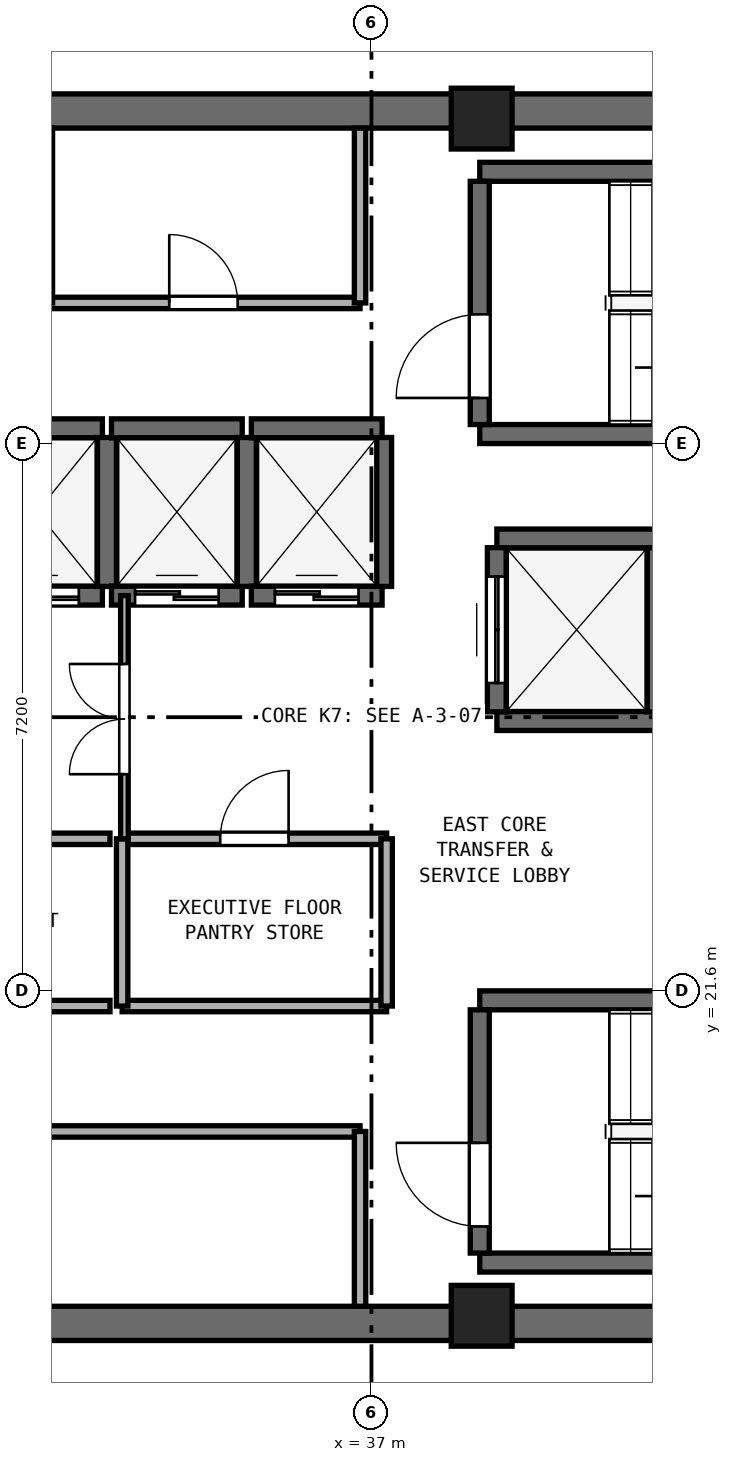
"""IFC4 building model, lengths in metres.
Left out: names, types, materials, properties, quantities, classifications, styles, units other than length and angle.
Written with IfcOpenShell. Run it as: python <this file> out.ifc"""

import sys

from ifc_helpers import new_model, si_unit, direction, frame, frame_2d, origin, origin_2d, place, context, subcontext, project, spatial, rectangle, extrude, element, fill, save


model = new_model("IFC4")
c1 = context("Model", 3, precision=1e-05, world=origin(), true_north=direction((0.0, 1.0)))
c2 = subcontext(c1, "Body", "Model", "MODEL_VIEW")
j1 = project(units=[si_unit("LENGTHUNIT", "METRE"), si_unit("PLANEANGLEUNIT", "RADIAN")], contexts=[c1])
p1 = place(None, origin())
s1 = spatial("IfcSite", under=j1, at=p1, CompositionType="ELEMENT")
p2 = place(p1, origin())
s2 = spatial("IfcBuilding", under=s1, at=p2, CompositionType="ELEMENT")
p3 = place(p2, frame((0.0, 0.0, 278.2)))
s3 = spatial("IfcBuildingStorey", under=s2, at=p3, CompositionType="ELEMENT", Elevation=278.2)
for number, where, z_axis, x_axis in (
    (1, (25.4, 17.225, 0.0), (0.0, 0.0, 1.0), (1.0, 0.0, 0.0)),
    (2, (25.4, 33.175, 0.0), (0.0, 0.0, 1.0), (1.0, 0.0, 0.0)),
):
    element("IfcWall", number, at=place(p3, frame(where, z_axis=z_axis, x_axis=x_axis)), inside=s3, PredefinedType="SHEAR", context=c2, shape_type="SweptSolid", body=[
        extrude(rectangle(XDim=23.2, YDim=0.45, at=frame_2d((11.6, 0.0))), origin(), (0.0, 0.0, 1.0), 3.54),
    ])
for number, where, z_axis, x_axis in (
    (3, (38.45, 17.325, 0.0), (0.0, 0.0, 1.0), (1.0, 0.0, 0.0)),
    (4, (38.45, 33.075, 0.0), (0.0, 0.0, 1.0), (1.0, 0.0, 0.0)),
):
    element("IfcColumn", number, at=place(p3, frame(where, z_axis=z_axis, x_axis=x_axis)), inside=s3, PredefinedType="PILASTER", context=c2, shape_type="SweptSolid", body=[
        extrude(rectangle(XDim=0.8, YDim=0.8, at=origin_2d()), origin(), (0.0, 0.0, 1.0), 3.8),
    ])
for number, where, z_axis, x_axis in (
    (5, (38.425, 28.925, 0.0), (0.0, 0.0, 1.0), (1.0, 0.0, 0.0)),
    (6, (38.425, 32.375, 0.0), (0.0, 0.0, 1.0), (1.0, 0.0, 0.0)),
):
    element("IfcWall", number, at=place(p3, frame(where, z_axis=z_axis, x_axis=x_axis)), inside=s3, PredefinedType="SHEAR", context=c2, shape_type="SweptSolid", body=[
        extrude(rectangle(XDim=7.3, YDim=0.25, at=frame_2d((3.65, 0.0))), origin(), (0.0, 0.0, 1.0), 3.54),
    ])
p4 = place(p3, frame((38.425, 29.05, 0.0), z_axis=(0.0, 0.0, 1.0), x_axis=(0.0, 1.0, 0.0)))
e7 = element("IfcWall", 7, at=p4, inside=s3, PredefinedType="SHEAR", context=c2, shape_type="SweptSolid", body=[
    extrude(rectangle(XDim=3.2, YDim=0.25, at=frame_2d((1.6, 0.0))), origin(), (0.0, 0.0, 1.0), 3.54),
])
p5 = place(p4, frame((0.35, 0.0, 0.0)))
e8 = element("IfcOpeningElement", 8, at=p5, cuts=e7, PredefinedType="OPENING", context=c2, shape_type="SweptSolid", body=[
    extrude(rectangle(XDim=1.1, YDim=2.15, at=frame_2d((0.55, 1.075))), frame((0.0, 0.135, 0.0), z_axis=(0.0, -1.0, 0.0), x_axis=(1.0, 0.0, 0.0)), (0.0, 0.0, 1.0), 0.27),
])
for number, where, z_axis, x_axis in (
    (9, (38.425, 18.025, 0.0), (0.0, 0.0, 1.0), (1.0, 0.0, 0.0)),
    (10, (38.425, 21.475, 0.0), (0.0, 0.0, 1.0), (1.0, 0.0, 0.0)),
):
    element("IfcWall", number, at=place(p3, frame(where, z_axis=z_axis, x_axis=x_axis)), inside=s3, PredefinedType="SHEAR", context=c2, shape_type="SweptSolid", body=[
        extrude(rectangle(XDim=7.3, YDim=0.25, at=frame_2d((3.65, 0.0))), origin(), (0.0, 0.0, 1.0), 3.54),
    ])
p6 = place(p3, frame((38.425, 18.15, 0.0), z_axis=(0.0, 0.0, 1.0), x_axis=(0.0, 1.0, 0.0)))
e11 = element("IfcWall", 11, at=p6, inside=s3, PredefinedType="SHEAR", context=c2, shape_type="SweptSolid", body=[
    extrude(rectangle(XDim=3.2, YDim=0.25, at=frame_2d((1.6, 0.0))), origin(), (0.0, 0.0, 1.0), 3.54),
])
p7 = place(p6, frame((0.35, 0.0, 0.0)))
e12 = element("IfcOpeningElement", 12, at=p7, cuts=e11, PredefinedType="OPENING", context=c2, shape_type="SweptSolid", body=[
    extrude(rectangle(XDim=1.1, YDim=2.15, at=frame_2d((0.55, 1.075))), frame((0.0, 0.135, 0.0), z_axis=(0.0, -1.0, 0.0), x_axis=(1.0, 0.0, 0.0)), (0.0, 0.0, 1.0), 0.27),
])
p8 = place(p3, frame((31.74, 26.8, 0.0), z_axis=(0.0, 0.0, 1.0), x_axis=(1.0, 0.0, 0.0)))
e13 = element("IfcWall", 13, at=p8, inside=s3, PredefinedType="SHEAR", context=c2, shape_type="SweptSolid", body=[
    extrude(rectangle(XDim=1.72, YDim=0.25, at=frame_2d((0.86, 0.0))), origin(), (0.0, 0.0, 1.0), 3.54),
])
p9 = place(p8, frame((0.31, 0.0, 0.0)))
e14 = element("IfcOpeningElement", 14, at=p9, cuts=e13, PredefinedType="OPENING", context=c2, shape_type="SweptSolid", body=[
    extrude(rectangle(XDim=1.1, YDim=2.15, at=frame_2d((0.55, 1.075))), frame((0.0, 0.135, 0.0), z_axis=(0.0, -1.0, 0.0), x_axis=(1.0, 0.0, 0.0)), (0.0, 0.0, 1.0), 0.27),
])
p10 = place(p3, frame((31.74, 29.0, 0.0), z_axis=(0.0, 0.0, 1.0), x_axis=(1.0, 0.0, 0.0)))
e15 = element("IfcWall", 15, at=p10, inside=s3, PredefinedType="SHEAR", context=c2, shape_type="SweptSolid", body=[
    extrude(rectangle(XDim=1.72, YDim=0.25, at=frame_2d((0.86, 0.0))), origin(), (0.0, 0.0, 1.0), 3.54),
])
p11 = place(p3, frame((33.52, 26.92, 0.0), z_axis=(0.0, 0.0, 1.0), x_axis=(0.0, 1.0, 0.0)))
e16 = element("IfcWall", 16, at=p11, inside=s3, PredefinedType="SHEAR", context=c2, shape_type="SweptSolid", body=[
    extrude(rectangle(XDim=1.96, YDim=0.25, at=frame_2d((0.98, 0.0))), origin(), (0.0, 0.0, 1.0), 3.54),
])
p12 = place(p3, frame((33.58, 26.8, 0.0), z_axis=(0.0, 0.0, 1.0), x_axis=(1.0, 0.0, 0.0)))
e17 = element("IfcWall", 17, at=p12, inside=s3, PredefinedType="SHEAR", context=c2, shape_type="SweptSolid", body=[
    extrude(rectangle(XDim=1.72, YDim=0.25, at=frame_2d((0.86, 0.0))), origin(), (0.0, 0.0, 1.0), 3.54),
])
p13 = place(p12, frame((0.31, 0.0, 0.0)))
e18 = element("IfcOpeningElement", 18, at=p13, cuts=e17, PredefinedType="OPENING", context=c2, shape_type="SweptSolid", body=[
    extrude(rectangle(XDim=1.1, YDim=2.15, at=frame_2d((0.55, 1.075))), frame((0.0, 0.135, 0.0), z_axis=(0.0, -1.0, 0.0), x_axis=(1.0, 0.0, 0.0)), (0.0, 0.0, 1.0), 0.27),
])
p14 = place(p3, frame((33.58, 29.0, 0.0), z_axis=(0.0, 0.0, 1.0), x_axis=(1.0, 0.0, 0.0)))
e19 = element("IfcWall", 19, at=p14, inside=s3, PredefinedType="SHEAR", context=c2, shape_type="SweptSolid", body=[
    extrude(rectangle(XDim=1.72, YDim=0.25, at=frame_2d((0.86, 0.0))), origin(), (0.0, 0.0, 1.0), 3.54),
])
p15 = place(p3, frame((35.36, 26.92, 0.0), z_axis=(0.0, 0.0, 1.0), x_axis=(0.0, 1.0, 0.0)))
e20 = element("IfcWall", 20, at=p15, inside=s3, PredefinedType="SHEAR", context=c2, shape_type="SweptSolid", body=[
    extrude(rectangle(XDim=1.96, YDim=0.25, at=frame_2d((0.98, 0.0))), origin(), (0.0, 0.0, 1.0), 3.54),
])
p16 = place(p3, frame((35.42, 26.8, 0.0), z_axis=(0.0, 0.0, 1.0), x_axis=(1.0, 0.0, 0.0)))
e21 = element("IfcWall", 21, at=p16, inside=s3, PredefinedType="SHEAR", context=c2, shape_type="SweptSolid", body=[
    extrude(rectangle(XDim=1.72, YDim=0.25, at=frame_2d((0.86, 0.0))), origin(), (0.0, 0.0, 1.0), 3.54),
])
p17 = place(p16, frame((0.31, 0.0, 0.0)))
e22 = element("IfcOpeningElement", 22, at=p17, cuts=e21, PredefinedType="OPENING", context=c2, shape_type="SweptSolid", body=[
    extrude(rectangle(XDim=1.1, YDim=2.15, at=frame_2d((0.55, 1.075))), frame((0.0, 0.135, 0.0), z_axis=(0.0, -1.0, 0.0), x_axis=(1.0, 0.0, 0.0)), (0.0, 0.0, 1.0), 0.27),
])
p18 = place(p3, frame((35.42, 29.0, 0.0), z_axis=(0.0, 0.0, 1.0), x_axis=(1.0, 0.0, 0.0)))
e23 = element("IfcWall", 23, at=p18, inside=s3, PredefinedType="SHEAR", context=c2, shape_type="SweptSolid", body=[
    extrude(rectangle(XDim=1.72, YDim=0.25, at=frame_2d((0.86, 0.0))), origin(), (0.0, 0.0, 1.0), 3.54),
])
p19 = place(p3, frame((37.14, 26.92, 0.0), z_axis=(0.0, 0.0, 1.0), x_axis=(0.0, 1.0, 0.0)))
e24 = element("IfcWall", 24, at=p19, inside=s3, PredefinedType="SHEAR", context=c2, shape_type="SweptSolid", body=[
    extrude(rectangle(XDim=1.96, YDim=0.25, at=frame_2d((0.98, 0.0))), origin(), (0.0, 0.0, 1.0), 3.54),
])
for number, where, z_axis, x_axis in (
    (25, (38.65, 25.15, 0.0), (0.0, 0.0, 1.0), (1.0, 0.0, 0.0)),
    (26, (38.65, 27.55, 0.0), (0.0, 0.0, 1.0), (1.0, 0.0, 0.0)),
):
    element("IfcWall", number, at=place(p3, frame(where, z_axis=z_axis, x_axis=x_axis)), inside=s3, PredefinedType="SHEAR", context=c2, shape_type="SweptSolid", body=[
        extrude(rectangle(XDim=2.1, YDim=0.25, at=frame_2d((1.05, 0.0))), origin(), (0.0, 0.0, 1.0), 3.54),
    ])
p20 = place(p3, frame((38.65, 25.27, 0.0), z_axis=(0.0, 0.0, 1.0), x_axis=(0.0, 1.0, 0.0)))
e27 = element("IfcWall", 27, at=p20, inside=s3, PredefinedType="SHEAR", context=c2, shape_type="SweptSolid", body=[
    extrude(rectangle(XDim=2.16, YDim=0.25, at=frame_2d((1.08, 0.0))), origin(), (0.0, 0.0, 1.0), 3.54),
])
p21 = place(p20, frame((0.38, 0.0, 0.0)))
e28 = element("IfcOpeningElement", 28, at=p21, cuts=e27, PredefinedType="OPENING", context=c2, shape_type="SweptSolid", body=[
    extrude(rectangle(XDim=1.4, YDim=2.2, at=frame_2d((0.7, 1.1))), frame((0.0, 0.135, 0.0), z_axis=(0.0, -1.0, 0.0), x_axis=(1.0, 0.0, 0.0)), (0.0, 0.0, 1.0), 0.27),
])
p22 = place(p3, frame((40.75, 25.27, 0.0), z_axis=(0.0, 0.0, 1.0), x_axis=(0.0, 1.0, 0.0)))
e29 = element("IfcWall", 29, at=p22, inside=s3, PredefinedType="SHEAR", context=c2, shape_type="SweptSolid", body=[
    extrude(rectangle(XDim=2.16, YDim=0.25, at=frame_2d((1.08, 0.0))), origin(), (0.0, 0.0, 1.0), 3.54),
])
p23 = place(p3, frame((32.73, 30.65, 0.0), z_axis=(0.0, 0.0, 1.0), x_axis=(1.0, 0.0, 0.0)))
e30 = element("IfcWall", 30, at=p23, inside=s3, PredefinedType="PARTITIONING", context=c2, shape_type="SweptSolid", body=[
    extrude(rectangle(XDim=4.12, YDim=0.15, at=frame_2d((2.06, 0.0))), origin(), (0.0, 0.0, 1.0), 3.54),
])
p24 = place(p23, frame((1.61, 0.0, 0.0)))
e31 = element("IfcOpeningElement", 31, at=p24, cuts=e30, PredefinedType="OPENING", context=c2, shape_type="SweptSolid", body=[
    extrude(rectangle(XDim=0.9, YDim=2.1, at=frame_2d((0.45, 1.05))), frame((0.0, 0.085, 0.0), z_axis=(0.0, -1.0, 0.0), x_axis=(1.0, 0.0, 0.0)), (0.0, 0.0, 1.0), 0.17),
])
for number, where, z_axis, x_axis in (
    (32, (32.73, 30.65, 0.0), (0.0, 0.0, 1.0), (0.0, 1.0, 0.0)),
    (33, (36.85, 30.65, 0.0), (0.0, 0.0, 1.0), (0.0, 1.0, 0.0)),
):
    element("IfcWall", number, at=place(p3, frame(where, z_axis=z_axis, x_axis=x_axis)), inside=s3, PredefinedType="PARTITIONING", context=c2, shape_type="SweptSolid", body=[
        extrude(rectangle(XDim=2.3, YDim=0.15, at=frame_2d((1.15, 0.0))), origin(), (0.0, 0.0, 1.0), 3.54),
    ])
p25 = place(p3, frame((25.97, 19.75, 0.0), z_axis=(0.0, 0.0, 1.0), x_axis=(1.0, 0.0, 0.0)))
e34 = element("IfcWall", 34, at=p25, inside=s3, PredefinedType="PARTITIONING", context=c2, shape_type="SweptSolid", body=[
    extrude(rectangle(XDim=10.88, YDim=0.15, at=frame_2d((5.44, 0.0))), origin(), (0.0, 0.0, 1.0), 3.54),
])
p26 = place(p25, frame((4.965, 0.0, 0.0)))
e35 = element("IfcOpeningElement", 35, at=p26, cuts=e34, PredefinedType="OPENING", context=c2, shape_type="SweptSolid", body=[
    extrude(rectangle(XDim=0.95, YDim=2.1, at=frame_2d((0.475, 1.05))), frame((0.0, 0.085, 0.0), z_axis=(0.0, -1.0, 0.0), x_axis=(1.0, 0.0, 0.0)), (0.0, 0.0, 1.0), 0.17),
])
p27 = place(p3, frame((36.85, 17.45, 0.0), z_axis=(0.0, 0.0, 1.0), x_axis=(0.0, 1.0, 0.0)))
e36 = element("IfcWall", 36, at=p27, inside=s3, PredefinedType="PARTITIONING", context=c2, shape_type="SweptSolid", body=[
    extrude(rectangle(XDim=2.3, YDim=0.15, at=frame_2d((1.15, 0.0))), origin(), (0.0, 0.0, 1.0), 3.54),
])
p28 = place(p3, frame((30.08, 21.4, 0.0), z_axis=(0.0, 0.0, 1.0), x_axis=(1.0, 0.0, 0.0)))
e37 = element("IfcWall", 37, at=p28, inside=s3, PredefinedType="PARTITIONING", context=c2, shape_type="SweptSolid", body=[
    extrude(rectangle(XDim=3.48, YDim=0.15, at=frame_2d((1.74, 0.0))), origin(), (0.0, 0.0, 1.0), 3.54),
])
p29 = place(p3, frame((30.08, 23.6, 0.0), z_axis=(0.0, 0.0, 1.0), x_axis=(1.0, 0.0, 0.0)))
e38 = element("IfcWall", 38, at=p29, inside=s3, PredefinedType="PARTITIONING", context=c2, shape_type="SweptSolid", body=[
    extrude(rectangle(XDim=3.48, YDim=0.15, at=frame_2d((1.74, 0.0))), origin(), (0.0, 0.0, 1.0), 3.54),
])
p30 = place(p29, frame((1.29, 0.0, 0.0)))
e39 = element("IfcOpeningElement", 39, at=p30, cuts=e38, PredefinedType="OPENING", context=c2, shape_type="SweptSolid", body=[
    extrude(rectangle(XDim=0.9, YDim=2.1, at=frame_2d((0.45, 1.05))), frame((0.0, 0.085, 0.0), z_axis=(0.0, -1.0, 0.0), x_axis=(1.0, 0.0, 0.0)), (0.0, 0.0, 1.0), 0.17),
])
p31 = place(p3, frame((33.72, 21.4, 0.0), z_axis=(0.0, 0.0, 1.0), x_axis=(1.0, 0.0, 0.0)))
e40 = element("IfcWall", 40, at=p31, inside=s3, PredefinedType="PARTITIONING", context=c2, shape_type="SweptSolid", body=[
    extrude(rectangle(XDim=3.48, YDim=0.15, at=frame_2d((1.74, 0.0))), origin(), (0.0, 0.0, 1.0), 3.54),
])
p32 = place(p3, frame((33.72, 23.6, 0.0), z_axis=(0.0, 0.0, 1.0), x_axis=(1.0, 0.0, 0.0)))
e41 = element("IfcWall", 41, at=p32, inside=s3, PredefinedType="PARTITIONING", context=c2, shape_type="SweptSolid", body=[
    extrude(rectangle(XDim=3.48, YDim=0.15, at=frame_2d((1.74, 0.0))), origin(), (0.0, 0.0, 1.0), 3.54),
])
p33 = place(p32, frame((1.29, 0.0, 0.0)))
e42 = element("IfcOpeningElement", 42, at=p33, cuts=e41, PredefinedType="OPENING", context=c2, shape_type="SweptSolid", body=[
    extrude(rectangle(XDim=0.9, YDim=2.1, at=frame_2d((0.45, 1.05))), frame((0.0, 0.085, 0.0), z_axis=(0.0, -1.0, 0.0), x_axis=(1.0, 0.0, 0.0)), (0.0, 0.0, 1.0), 0.17),
])
for number, where, z_axis, x_axis in (
    (43, (33.72, 21.4, 0.0), (0.0, 0.0, 1.0), (0.0, 1.0, 0.0)),
    (44, (37.2, 21.4, 0.0), (0.0, 0.0, 1.0), (0.0, 1.0, 0.0)),
):
    element("IfcWall", number, at=place(p3, frame(where, z_axis=z_axis, x_axis=x_axis)), inside=s3, PredefinedType="PARTITIONING", context=c2, shape_type="SweptSolid", body=[
        extrude(rectangle(XDim=2.2, YDim=0.15, at=frame_2d((1.1, 0.0))), origin(), (0.0, 0.0, 1.0), 3.54),
    ])
p34 = place(p3, frame((33.75, 23.6, 0.0), z_axis=(0.0, 0.0, 1.0), x_axis=(0.0, 1.0, 0.0)))
e45 = element("IfcWall", 45, at=p34, inside=s3, PredefinedType="PARTITIONING", context=c2, shape_type="SweptSolid", body=[
    extrude(rectangle(XDim=3.2, YDim=0.1, at=frame_2d((1.6, 0.0))), origin(), (0.0, 0.0, 1.0), 3.54),
])
p35 = place(p34, frame((0.85, 0.0, 0.0)))
e46 = element("IfcOpeningElement", 46, at=p35, cuts=e45, PredefinedType="OPENING", context=c2, shape_type="SweptSolid", body=[
    extrude(rectangle(XDim=1.45, YDim=2.12, at=frame_2d((0.725, 1.06))), frame((0.0, 0.06, 0.0), z_axis=(0.0, -1.0, 0.0), x_axis=(1.0, 0.0, 0.0)), (0.0, 0.0, 1.0), 0.12),
])
p36 = place(p5, origin())
e47 = element("IfcDoor", 47, at=p36, inside=s3, OperationType="SINGLE_SWING_LEFT", PredefinedType="DOOR", context=c2, shape_type="SweptSolid", body=[
    extrude(rectangle(XDim=1.1, YDim=2.15, at=frame_2d((0.55, 1.075))), frame((0.0, 0.025, 0.0), z_axis=(0.0, -1.0, 0.0), x_axis=(1.0, 0.0, 0.0)), (0.0, 0.0, 1.0), 0.05),
])
fill(e8, e47)
p37 = place(p7, origin())
e48 = element("IfcDoor", 48, at=p37, inside=s3, OperationType="SINGLE_SWING_RIGHT", PredefinedType="DOOR", context=c2, shape_type="SweptSolid", body=[
    extrude(rectangle(XDim=1.1, YDim=2.15, at=frame_2d((0.55, 1.075))), frame((0.0, 0.025, 0.0), z_axis=(0.0, -1.0, 0.0), x_axis=(1.0, 0.0, 0.0)), (0.0, 0.0, 1.0), 0.05),
])
fill(e12, e48)
p38 = place(p9, origin())
e49 = element("IfcDoor", 49, at=p38, inside=s3, OperationType="DOUBLE_DOOR_SLIDING", PredefinedType="DOOR", context=c2, shape_type="SweptSolid", body=[
    extrude(rectangle(XDim=1.1, YDim=2.15, at=frame_2d((0.55, 1.075))), frame((0.0, 0.025, 0.0), z_axis=(0.0, -1.0, 0.0), x_axis=(1.0, 0.0, 0.0)), (0.0, 0.0, 1.0), 0.05),
])
fill(e14, e49)
p39 = place(p13, origin())
e50 = element("IfcDoor", 50, at=p39, inside=s3, OperationType="DOUBLE_DOOR_SLIDING", PredefinedType="DOOR", context=c2, shape_type="SweptSolid", body=[
    extrude(rectangle(XDim=1.1, YDim=2.15, at=frame_2d((0.55, 1.075))), frame((0.0, 0.025, 0.0), z_axis=(0.0, -1.0, 0.0), x_axis=(1.0, 0.0, 0.0)), (0.0, 0.0, 1.0), 0.05),
])
fill(e18, e50)
p40 = place(p17, origin())
e51 = element("IfcDoor", 51, at=p40, inside=s3, OperationType="DOUBLE_DOOR_SLIDING", PredefinedType="DOOR", context=c2, shape_type="SweptSolid", body=[
    extrude(rectangle(XDim=1.1, YDim=2.15, at=frame_2d((0.55, 1.075))), frame((0.0, 0.025, 0.0), z_axis=(0.0, -1.0, 0.0), x_axis=(1.0, 0.0, 0.0)), (0.0, 0.0, 1.0), 0.05),
])
fill(e22, e51)
p41 = place(p21, origin())
e52 = element("IfcDoor", 52, at=p41, inside=s3, OperationType="DOUBLE_DOOR_SLIDING", PredefinedType="DOOR", context=c2, shape_type="SweptSolid", body=[
    extrude(rectangle(XDim=1.4, YDim=2.2, at=frame_2d((0.7, 1.1))), frame((0.0, 0.025, 0.0), z_axis=(0.0, -1.0, 0.0), x_axis=(1.0, 0.0, 0.0)), (0.0, 0.0, 1.0), 0.05),
])
fill(e28, e52)
p42 = place(p24, origin())
e53 = element("IfcDoor", 53, at=p42, inside=s3, OperationType="SINGLE_SWING_LEFT", PredefinedType="DOOR", context=c2, shape_type="SweptSolid", body=[
    extrude(rectangle(XDim=0.9, YDim=2.1, at=frame_2d((0.45, 1.05))), frame((0.0, 0.025, 0.0), z_axis=(0.0, -1.0, 0.0), x_axis=(1.0, 0.0, 0.0)), (0.0, 0.0, 1.0), 0.05),
])
fill(e31, e53)
p43 = place(p33, origin())
e54 = element("IfcDoor", 54, at=p43, inside=s3, OperationType="SINGLE_SWING_RIGHT", PredefinedType="DOOR", context=c2, shape_type="SweptSolid", body=[
    extrude(rectangle(XDim=0.9, YDim=2.1, at=frame_2d((0.45, 1.05))), frame((0.0, 0.025, 0.0), z_axis=(0.0, -1.0, 0.0), x_axis=(1.0, 0.0, 0.0)), (0.0, 0.0, 1.0), 0.05),
])
fill(e42, e54)
p44 = place(p35, origin())
e55 = element("IfcDoor", 55, at=p44, inside=s3, OperationType="DOUBLE_DOOR_SINGLE_SWING", PredefinedType="DOOR", context=c2, shape_type="SweptSolid", body=[
    extrude(rectangle(XDim=1.45, YDim=2.12, at=frame_2d((0.725, 1.06))), frame((0.0, 0.025, 0.0), z_axis=(0.0, -1.0, 0.0), x_axis=(1.0, 0.0, 0.0)), (0.0, 0.0, 1.0), 0.05),
])
fill(e46, e55)
save(model, sys.argv[1])
